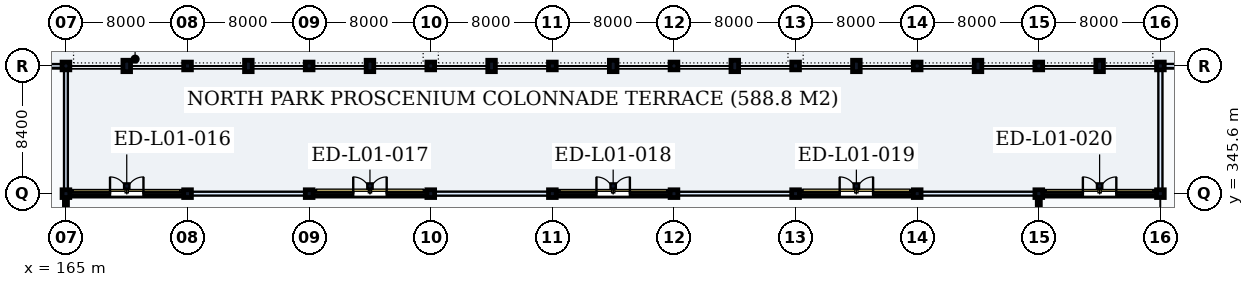
"""IFC4 building model, lengths in metres.
Left out: names, types, materials, properties, quantities, classifications, styles, units other than length and angle.
Written with IfcOpenShell. Run it as: python <this file> out.ifc"""

import sys

from ifc_helpers import new_model, si_unit, direction, frame, frame_2d, origin, origin_2d, place, context, subcontext, project, spatial, rectangle, hollow_circle, extrude, element, fill, save


model = new_model("IFC4")
c1 = context("Model", 3, precision=1e-05, world=origin(), true_north=direction((0.0, 1.0)))
c2 = subcontext(c1, "Body", "Model", "MODEL_VIEW")
j1 = project(units=[si_unit("LENGTHUNIT", "METRE"), si_unit("PLANEANGLEUNIT", "RADIAN")], contexts=[c1])
p1 = place(None, origin())
s1 = spatial("IfcSite", under=j1, at=p1, CompositionType="ELEMENT")
p2 = place(p1, origin())
s2 = spatial("IfcBuilding", under=s1, at=p2, CompositionType="ELEMENT")
p3 = place(p2, origin())
s3 = spatial("IfcBuildingStorey", under=s2, at=p3, CompositionType="ELEMENT", Elevation=0.0)
p4 = place(p3, frame((165.0, 345.6, 0.0), z_axis=(0.0, 0.0, 1.0), x_axis=(1.0, 0.0, 0.0)))
e1 = element("IfcColumn", 1, at=p4, inside=s3, PredefinedType="COLUMN", context=c2, shape_type="SweptSolid", body=[
    extrude(hollow_circle(Radius=0.254, WallThickness=0.016, at=origin_2d()), origin(), (0.0, 0.0, 1.0), 5.35),
])
p5 = place(p3, frame((165.0, 354.0, 0.0), z_axis=(0.0, 0.0, 1.0), x_axis=(1.0, 0.0, 0.0)))
e2 = element("IfcColumn", 2, at=p5, inside=s3, PredefinedType="COLUMN", context=c2, shape_type="SweptSolid", body=[
    extrude(hollow_circle(Radius=0.254, WallThickness=0.016, at=origin_2d()), origin(), (0.0, 0.0, 1.0), 5.4),
])
p6 = place(p3, frame((173.0, 345.6, 0.0), z_axis=(0.0, 0.0, 1.0), x_axis=(1.0, 0.0, 0.0)))
e3 = element("IfcColumn", 3, at=p6, inside=s3, PredefinedType="COLUMN", context=c2, shape_type="SweptSolid", body=[
    extrude(hollow_circle(Radius=0.254, WallThickness=0.016, at=origin_2d()), origin(), (0.0, 0.0, 1.0), 5.35),
])
p7 = place(p3, frame((173.0, 354.0, 0.0), z_axis=(0.0, 0.0, 1.0), x_axis=(1.0, 0.0, 0.0)))
e4 = element("IfcColumn", 4, at=p7, inside=s3, PredefinedType="COLUMN", context=c2, shape_type="SweptSolid", body=[
    extrude(hollow_circle(Radius=0.254, WallThickness=0.016, at=origin_2d()), origin(), (0.0, 0.0, 1.0), 5.4),
])
p8 = place(p3, frame((181.0, 345.6, 0.0), z_axis=(0.0, 0.0, 1.0), x_axis=(1.0, 0.0, 0.0)))
e5 = element("IfcColumn", 5, at=p8, inside=s3, PredefinedType="COLUMN", context=c2, shape_type="SweptSolid", body=[
    extrude(hollow_circle(Radius=0.254, WallThickness=0.016, at=origin_2d()), origin(), (0.0, 0.0, 1.0), 5.35),
])
p9 = place(p3, frame((181.0, 354.0, 0.0), z_axis=(0.0, 0.0, 1.0), x_axis=(1.0, 0.0, 0.0)))
e6 = element("IfcColumn", 6, at=p9, inside=s3, PredefinedType="COLUMN", context=c2, shape_type="SweptSolid", body=[
    extrude(hollow_circle(Radius=0.254, WallThickness=0.016, at=origin_2d()), origin(), (0.0, 0.0, 1.0), 5.4),
])
p10 = place(p3, frame((189.0, 345.6, 0.0), z_axis=(0.0, 0.0, 1.0), x_axis=(1.0, 0.0, 0.0)))
e7 = element("IfcColumn", 7, at=p10, inside=s3, PredefinedType="COLUMN", context=c2, shape_type="SweptSolid", body=[
    extrude(hollow_circle(Radius=0.254, WallThickness=0.016, at=origin_2d()), origin(), (0.0, 0.0, 1.0), 5.35),
])
p11 = place(p3, frame((189.0, 354.0, 0.0), z_axis=(0.0, 0.0, 1.0), x_axis=(1.0, 0.0, 0.0)))
e8 = element("IfcColumn", 8, at=p11, inside=s3, PredefinedType="COLUMN", context=c2, shape_type="SweptSolid", body=[
    extrude(hollow_circle(Radius=0.254, WallThickness=0.016, at=origin_2d()), origin(), (0.0, 0.0, 1.0), 5.4),
])
p12 = place(p3, frame((197.0, 345.6, 0.0), z_axis=(0.0, 0.0, 1.0), x_axis=(1.0, 0.0, 0.0)))
e9 = element("IfcColumn", 9, at=p12, inside=s3, PredefinedType="COLUMN", context=c2, shape_type="SweptSolid", body=[
    extrude(hollow_circle(Radius=0.254, WallThickness=0.016, at=origin_2d()), origin(), (0.0, 0.0, 1.0), 5.35),
])
p13 = place(p3, frame((197.0, 354.0, 0.0), z_axis=(0.0, 0.0, 1.0), x_axis=(1.0, 0.0, 0.0)))
e10 = element("IfcColumn", 10, at=p13, inside=s3, PredefinedType="COLUMN", context=c2, shape_type="SweptSolid", body=[
    extrude(hollow_circle(Radius=0.254, WallThickness=0.016, at=origin_2d()), origin(), (0.0, 0.0, 1.0), 5.4),
])
p14 = place(p3, frame((205.0, 345.6, 0.0), z_axis=(0.0, 0.0, 1.0), x_axis=(1.0, 0.0, 0.0)))
e11 = element("IfcColumn", 11, at=p14, inside=s3, PredefinedType="COLUMN", context=c2, shape_type="SweptSolid", body=[
    extrude(hollow_circle(Radius=0.254, WallThickness=0.016, at=origin_2d()), origin(), (0.0, 0.0, 1.0), 5.35),
])
p15 = place(p3, frame((205.0, 354.0, 0.0), z_axis=(0.0, 0.0, 1.0), x_axis=(1.0, 0.0, 0.0)))
e12 = element("IfcColumn", 12, at=p15, inside=s3, PredefinedType="COLUMN", context=c2, shape_type="SweptSolid", body=[
    extrude(hollow_circle(Radius=0.254, WallThickness=0.016, at=origin_2d()), origin(), (0.0, 0.0, 1.0), 5.4),
])
p16 = place(p3, frame((213.0, 345.6, 0.0), z_axis=(0.0, 0.0, 1.0), x_axis=(1.0, 0.0, 0.0)))
e13 = element("IfcColumn", 13, at=p16, inside=s3, PredefinedType="COLUMN", context=c2, shape_type="SweptSolid", body=[
    extrude(hollow_circle(Radius=0.254, WallThickness=0.016, at=origin_2d()), origin(), (0.0, 0.0, 1.0), 5.35),
])
p17 = place(p3, frame((213.0, 354.0, 0.0), z_axis=(0.0, 0.0, 1.0), x_axis=(1.0, 0.0, 0.0)))
e14 = element("IfcColumn", 14, at=p17, inside=s3, PredefinedType="COLUMN", context=c2, shape_type="SweptSolid", body=[
    extrude(hollow_circle(Radius=0.254, WallThickness=0.016, at=origin_2d()), origin(), (0.0, 0.0, 1.0), 5.4),
])
p18 = place(p3, frame((221.0, 345.6, 0.0), z_axis=(0.0, 0.0, 1.0), x_axis=(1.0, 0.0, 0.0)))
e15 = element("IfcColumn", 15, at=p18, inside=s3, PredefinedType="COLUMN", context=c2, shape_type="SweptSolid", body=[
    extrude(hollow_circle(Radius=0.254, WallThickness=0.016, at=origin_2d()), origin(), (0.0, 0.0, 1.0), 5.35),
])
p19 = place(p3, frame((221.0, 354.0, 0.0), z_axis=(0.0, 0.0, 1.0), x_axis=(1.0, 0.0, 0.0)))
e16 = element("IfcColumn", 16, at=p19, inside=s3, PredefinedType="COLUMN", context=c2, shape_type="SweptSolid", body=[
    extrude(hollow_circle(Radius=0.254, WallThickness=0.016, at=origin_2d()), origin(), (0.0, 0.0, 1.0), 5.4),
])
p20 = place(p3, frame((229.0, 345.6, 0.0), z_axis=(0.0, 0.0, 1.0), x_axis=(1.0, 0.0, 0.0)))
e17 = element("IfcColumn", 17, at=p20, inside=s3, PredefinedType="COLUMN", context=c2, shape_type="SweptSolid", body=[
    extrude(hollow_circle(Radius=0.254, WallThickness=0.016, at=origin_2d()), origin(), (0.0, 0.0, 1.0), 5.35),
])
p21 = place(p3, frame((229.0, 354.0, 0.0), z_axis=(0.0, 0.0, 1.0), x_axis=(1.0, 0.0, 0.0)))
e18 = element("IfcColumn", 18, at=p21, inside=s3, PredefinedType="COLUMN", context=c2, shape_type="SweptSolid", body=[
    extrude(hollow_circle(Radius=0.254, WallThickness=0.016, at=origin_2d()), origin(), (0.0, 0.0, 1.0), 5.4),
])
p22 = place(p3, frame((237.0, 345.6, 0.0), z_axis=(0.0, 0.0, 1.0), x_axis=(1.0, 0.0, 0.0)))
e19 = element("IfcColumn", 19, at=p22, inside=s3, PredefinedType="COLUMN", context=c2, shape_type="SweptSolid", body=[
    extrude(hollow_circle(Radius=0.254, WallThickness=0.016, at=origin_2d()), origin(), (0.0, 0.0, 1.0), 5.35),
])
p23 = place(p3, frame((237.0, 354.0, 0.0), z_axis=(0.0, 0.0, 1.0), x_axis=(1.0, 0.0, 0.0)))
e20 = element("IfcColumn", 20, at=p23, inside=s3, PredefinedType="COLUMN", context=c2, shape_type="SweptSolid", body=[
    extrude(hollow_circle(Radius=0.254, WallThickness=0.016, at=origin_2d()), origin(), (0.0, 0.0, 1.0), 5.4),
])
for number, where, z_axis, x_axis in (
    (21, (169.0, 354.0, 0.0), (0.0, 0.0, 1.0), (1.0, 0.0, 0.0)),
    (22, (177.0, 354.0, 0.0), (0.0, 0.0, 1.0), (1.0, 0.0, 0.0)),
    (23, (185.0, 354.0, 0.0), (0.0, 0.0, 1.0), (1.0, 0.0, 0.0)),
    (24, (193.0, 354.0, 0.0), (0.0, 0.0, 1.0), (1.0, 0.0, 0.0)),
    (25, (201.0, 354.0, 0.0), (0.0, 0.0, 1.0), (1.0, 0.0, 0.0)),
    (26, (209.0, 354.0, 0.0), (0.0, 0.0, 1.0), (1.0, 0.0, 0.0)),
    (27, (217.0, 354.0, 0.0), (0.0, 0.0, 1.0), (1.0, 0.0, 0.0)),
    (28, (225.0, 354.0, 0.0), (0.0, 0.0, 1.0), (1.0, 0.0, 0.0)),
    (29, (233.0, 354.0, 0.0), (0.0, 0.0, 1.0), (1.0, 0.0, 0.0)),
):
    element("IfcColumn", number, at=place(p3, frame(where, z_axis=z_axis, x_axis=x_axis)), inside=s3, PredefinedType="PILASTER", context=c2, shape_type="SweptSolid", body=[
        extrude(rectangle(XDim=0.5, YDim=0.75, at=origin_2d()), origin(), (0.0, 0.0, 1.0), 5.4),
    ])
p24 = place(p3, frame((165.006, 345.6, 0.0), z_axis=(0.0, 0.0, 1.0), x_axis=(1.0, 0.0, 0.0)))
e30 = element("IfcWall", 30, at=p24, inside=s3, PredefinedType="SOLIDWALL", context=c2, shape_type="SweptSolid", body=[
    extrude(rectangle(XDim=7.988, YDim=0.32, at=frame_2d((3.994, 0.0))), origin(), (0.0, 0.0, 1.0), 4.688),
])
p25 = place(p24, frame((2.894, 0.0, 0.0)))
e31 = element("IfcOpeningElement", 31, at=p25, cuts=e30, PredefinedType="OPENING", context=c2, shape_type="SweptSolid", body=[
    extrude(rectangle(XDim=2.2, YDim=2.8, at=frame_2d((1.1, 1.4))), frame((0.0, 0.175, 0.0), z_axis=(0.0, -1.0, 0.0), x_axis=(1.0, 0.0, 0.0)), (0.0, 0.0, 1.0), 0.35),
])
p26 = place(p3, frame((181.006, 345.6, 0.0), z_axis=(0.0, 0.0, 1.0), x_axis=(1.0, 0.0, 0.0)))
e32 = element("IfcWall", 32, at=p26, inside=s3, PredefinedType="SOLIDWALL", context=c2, shape_type="SweptSolid", body=[
    extrude(rectangle(XDim=7.988, YDim=0.32, at=frame_2d((3.994, 0.0))), origin(), (0.0, 0.0, 1.0), 4.688),
])
p27 = place(p26, frame((2.894, 0.0, 0.0)))
e33 = element("IfcOpeningElement", 33, at=p27, cuts=e32, PredefinedType="OPENING", context=c2, shape_type="SweptSolid", body=[
    extrude(rectangle(XDim=2.2, YDim=2.8, at=frame_2d((1.1, 1.4))), frame((0.0, 0.175, 0.0), z_axis=(0.0, -1.0, 0.0), x_axis=(1.0, 0.0, 0.0)), (0.0, 0.0, 1.0), 0.35),
])
p28 = place(p3, frame((197.006, 345.6, 0.0), z_axis=(0.0, 0.0, 1.0), x_axis=(1.0, 0.0, 0.0)))
e34 = element("IfcWall", 34, at=p28, inside=s3, PredefinedType="SOLIDWALL", context=c2, shape_type="SweptSolid", body=[
    extrude(rectangle(XDim=7.988, YDim=0.32, at=frame_2d((3.994, 0.0))), origin(), (0.0, 0.0, 1.0), 4.688),
])
p29 = place(p28, frame((2.894, 0.0, 0.0)))
e35 = element("IfcOpeningElement", 35, at=p29, cuts=e34, PredefinedType="OPENING", context=c2, shape_type="SweptSolid", body=[
    extrude(rectangle(XDim=2.2, YDim=2.8, at=frame_2d((1.1, 1.4))), frame((0.0, 0.175, 0.0), z_axis=(0.0, -1.0, 0.0), x_axis=(1.0, 0.0, 0.0)), (0.0, 0.0, 1.0), 0.35),
])
p30 = place(p3, frame((213.006, 345.6, 0.0), z_axis=(0.0, 0.0, 1.0), x_axis=(1.0, 0.0, 0.0)))
e36 = element("IfcWall", 36, at=p30, inside=s3, PredefinedType="SOLIDWALL", context=c2, shape_type="SweptSolid", body=[
    extrude(rectangle(XDim=7.988, YDim=0.32, at=frame_2d((3.994, 0.0))), origin(), (0.0, 0.0, 1.0), 4.688),
])
p31 = place(p30, frame((2.894, 0.0, 0.0)))
e37 = element("IfcOpeningElement", 37, at=p31, cuts=e36, PredefinedType="OPENING", context=c2, shape_type="SweptSolid", body=[
    extrude(rectangle(XDim=2.2, YDim=2.8, at=frame_2d((1.1, 1.4))), frame((0.0, 0.175, 0.0), z_axis=(0.0, -1.0, 0.0), x_axis=(1.0, 0.0, 0.0)), (0.0, 0.0, 1.0), 0.35),
])
p32 = place(p3, frame((229.006, 345.6, 0.0), z_axis=(0.0, 0.0, 1.0), x_axis=(1.0, 0.0, 0.0)))
e38 = element("IfcWall", 38, at=p32, inside=s3, PredefinedType="SOLIDWALL", context=c2, shape_type="SweptSolid", body=[
    extrude(rectangle(XDim=7.988, YDim=0.32, at=frame_2d((3.994, 0.0))), origin(), (0.0, 0.0, 1.0), 4.688),
])
p33 = place(p32, frame((2.894, 0.0, 0.0)))
e39 = element("IfcOpeningElement", 39, at=p33, cuts=e38, PredefinedType="OPENING", context=c2, shape_type="SweptSolid", body=[
    extrude(rectangle(XDim=2.2, YDim=2.8, at=frame_2d((1.1, 1.4))), frame((0.0, 0.175, 0.0), z_axis=(0.0, -1.0, 0.0), x_axis=(1.0, 0.0, 0.0)), (0.0, 0.0, 1.0), 0.35),
])
p34 = place(p3, frame((150.1, 353.9, 5.4), z_axis=(0.0, 0.0, 1.0), x_axis=(1.0, 0.0, 0.0)))
e40 = element("IfcWall", 40, at=p34, inside=s3, PredefinedType="PARAPET", context=c2, shape_type="SweptSolid", body=[
    extrude(rectangle(XDim=104.8, YDim=0.18, at=frame_2d((52.4, 0.0))), origin(), (0.0, 0.0, 1.0), 1.2),
])
p35 = place(p3, frame((165.0, 308.4, 0.0), z_axis=(0.0, 0.0, 1.0), x_axis=(0.0, 1.0, 0.0)))
e41 = element("IfcWall", 41, at=p35, inside=s3, PredefinedType="PARTITIONING", context=c2, shape_type="SweptSolid", body=[
    extrude(rectangle(XDim=37.2, YDim=0.2, at=frame_2d((18.6, 0.0))), origin(), (0.0, 0.0, 1.0), 4.778),
])
p36 = place(p35, frame((12.86, 0.0, 0.0)))
e42 = element("IfcOpeningElement", 42, at=p36, cuts=e41, PredefinedType="OPENING", context=c2, shape_type="SweptSolid", body=[
    extrude(rectangle(XDim=1.8, YDim=2.4, at=frame_2d((0.9, 1.2))), frame((0.0, 0.115, 0.0), z_axis=(0.0, -1.0, 0.0), x_axis=(1.0, 0.0, 0.0)), (0.0, 0.0, 1.0), 0.23),
])
p37 = place(p3, frame((229.0, 258.2, 0.0), z_axis=(0.0, 0.0, 1.0), x_axis=(0.0, 1.0, 0.0)))
e43 = element("IfcWall", 43, at=p37, inside=s3, PredefinedType="PARTITIONING", context=c2, shape_type="SweptSolid", body=[
    extrude(rectangle(XDim=87.4, YDim=0.2, at=frame_2d((43.7, 0.0))), origin(), (0.0, 0.0, 1.0), 2.118),
])
p38 = place(p37, frame((17.1, 0.0, 0.0)))
e44 = element("IfcOpeningElement", 44, at=p38, cuts=e43, PredefinedType="OPENING", context=c2, shape_type="SweptSolid", body=[
    extrude(rectangle(XDim=1.8, YDim=2.1, at=frame_2d((0.9, 1.05))), frame((0.0, 0.115, 0.0), z_axis=(0.0, -1.0, 0.0), x_axis=(1.0, 0.0, 0.0)), (0.0, 0.0, 1.0), 0.23),
])
p39 = place(p37, frame((63.06, 0.0, 0.0)))
e45 = element("IfcOpeningElement", 45, at=p39, cuts=e43, PredefinedType="OPENING", context=c2, shape_type="SweptSolid", body=[
    extrude(rectangle(XDim=1.8, YDim=2.4, at=frame_2d((0.9, 1.2))), frame((0.0, 0.115, 0.0), z_axis=(0.0, -1.0, 0.0), x_axis=(1.0, 0.0, 0.0)), (0.0, 0.0, 1.0), 0.23),
])
p40 = place(p25, origin())
e46 = element("IfcDoor", 46, at=p40, inside=s3, OperationType="DOUBLE_DOOR_SINGLE_SWING", PredefinedType="DOOR", context=c2, shape_type="SweptSolid", body=[
    extrude(rectangle(XDim=2.2, YDim=2.8, at=frame_2d((1.1, 1.4))), frame((0.0, 0.025, 0.0), z_axis=(0.0, -1.0, 0.0), x_axis=(1.0, 0.0, 0.0)), (0.0, 0.0, 1.0), 0.05),
])
fill(e31, e46)
p41 = place(p27, origin())
e47 = element("IfcDoor", 47, at=p41, inside=s3, OperationType="DOUBLE_DOOR_SINGLE_SWING", PredefinedType="DOOR", context=c2, shape_type="SweptSolid", body=[
    extrude(rectangle(XDim=2.2, YDim=2.8, at=frame_2d((1.1, 1.4))), frame((0.0, 0.025, 0.0), z_axis=(0.0, -1.0, 0.0), x_axis=(1.0, 0.0, 0.0)), (0.0, 0.0, 1.0), 0.05),
])
fill(e33, e47)
p42 = place(p29, origin())
e48 = element("IfcDoor", 48, at=p42, inside=s3, OperationType="DOUBLE_DOOR_SINGLE_SWING", PredefinedType="DOOR", context=c2, shape_type="SweptSolid", body=[
    extrude(rectangle(XDim=2.2, YDim=2.8, at=frame_2d((1.1, 1.4))), frame((0.0, 0.025, 0.0), z_axis=(0.0, -1.0, 0.0), x_axis=(1.0, 0.0, 0.0)), (0.0, 0.0, 1.0), 0.05),
])
fill(e35, e48)
p43 = place(p31, origin())
e49 = element("IfcDoor", 49, at=p43, inside=s3, OperationType="DOUBLE_DOOR_SINGLE_SWING", PredefinedType="DOOR", context=c2, shape_type="SweptSolid", body=[
    extrude(rectangle(XDim=2.2, YDim=2.8, at=frame_2d((1.1, 1.4))), frame((0.0, 0.025, 0.0), z_axis=(0.0, -1.0, 0.0), x_axis=(1.0, 0.0, 0.0)), (0.0, 0.0, 1.0), 0.05),
])
fill(e37, e49)
p44 = place(p33, origin())
e50 = element("IfcDoor", 50, at=p44, inside=s3, OperationType="DOUBLE_DOOR_SINGLE_SWING", PredefinedType="DOOR", context=c2, shape_type="SweptSolid", body=[
    extrude(rectangle(XDim=2.2, YDim=2.8, at=frame_2d((1.1, 1.4))), frame((0.0, 0.025, 0.0), z_axis=(0.0, -1.0, 0.0), x_axis=(1.0, 0.0, 0.0)), (0.0, 0.0, 1.0), 0.05),
])
fill(e39, e50)
save(model, sys.argv[1])
